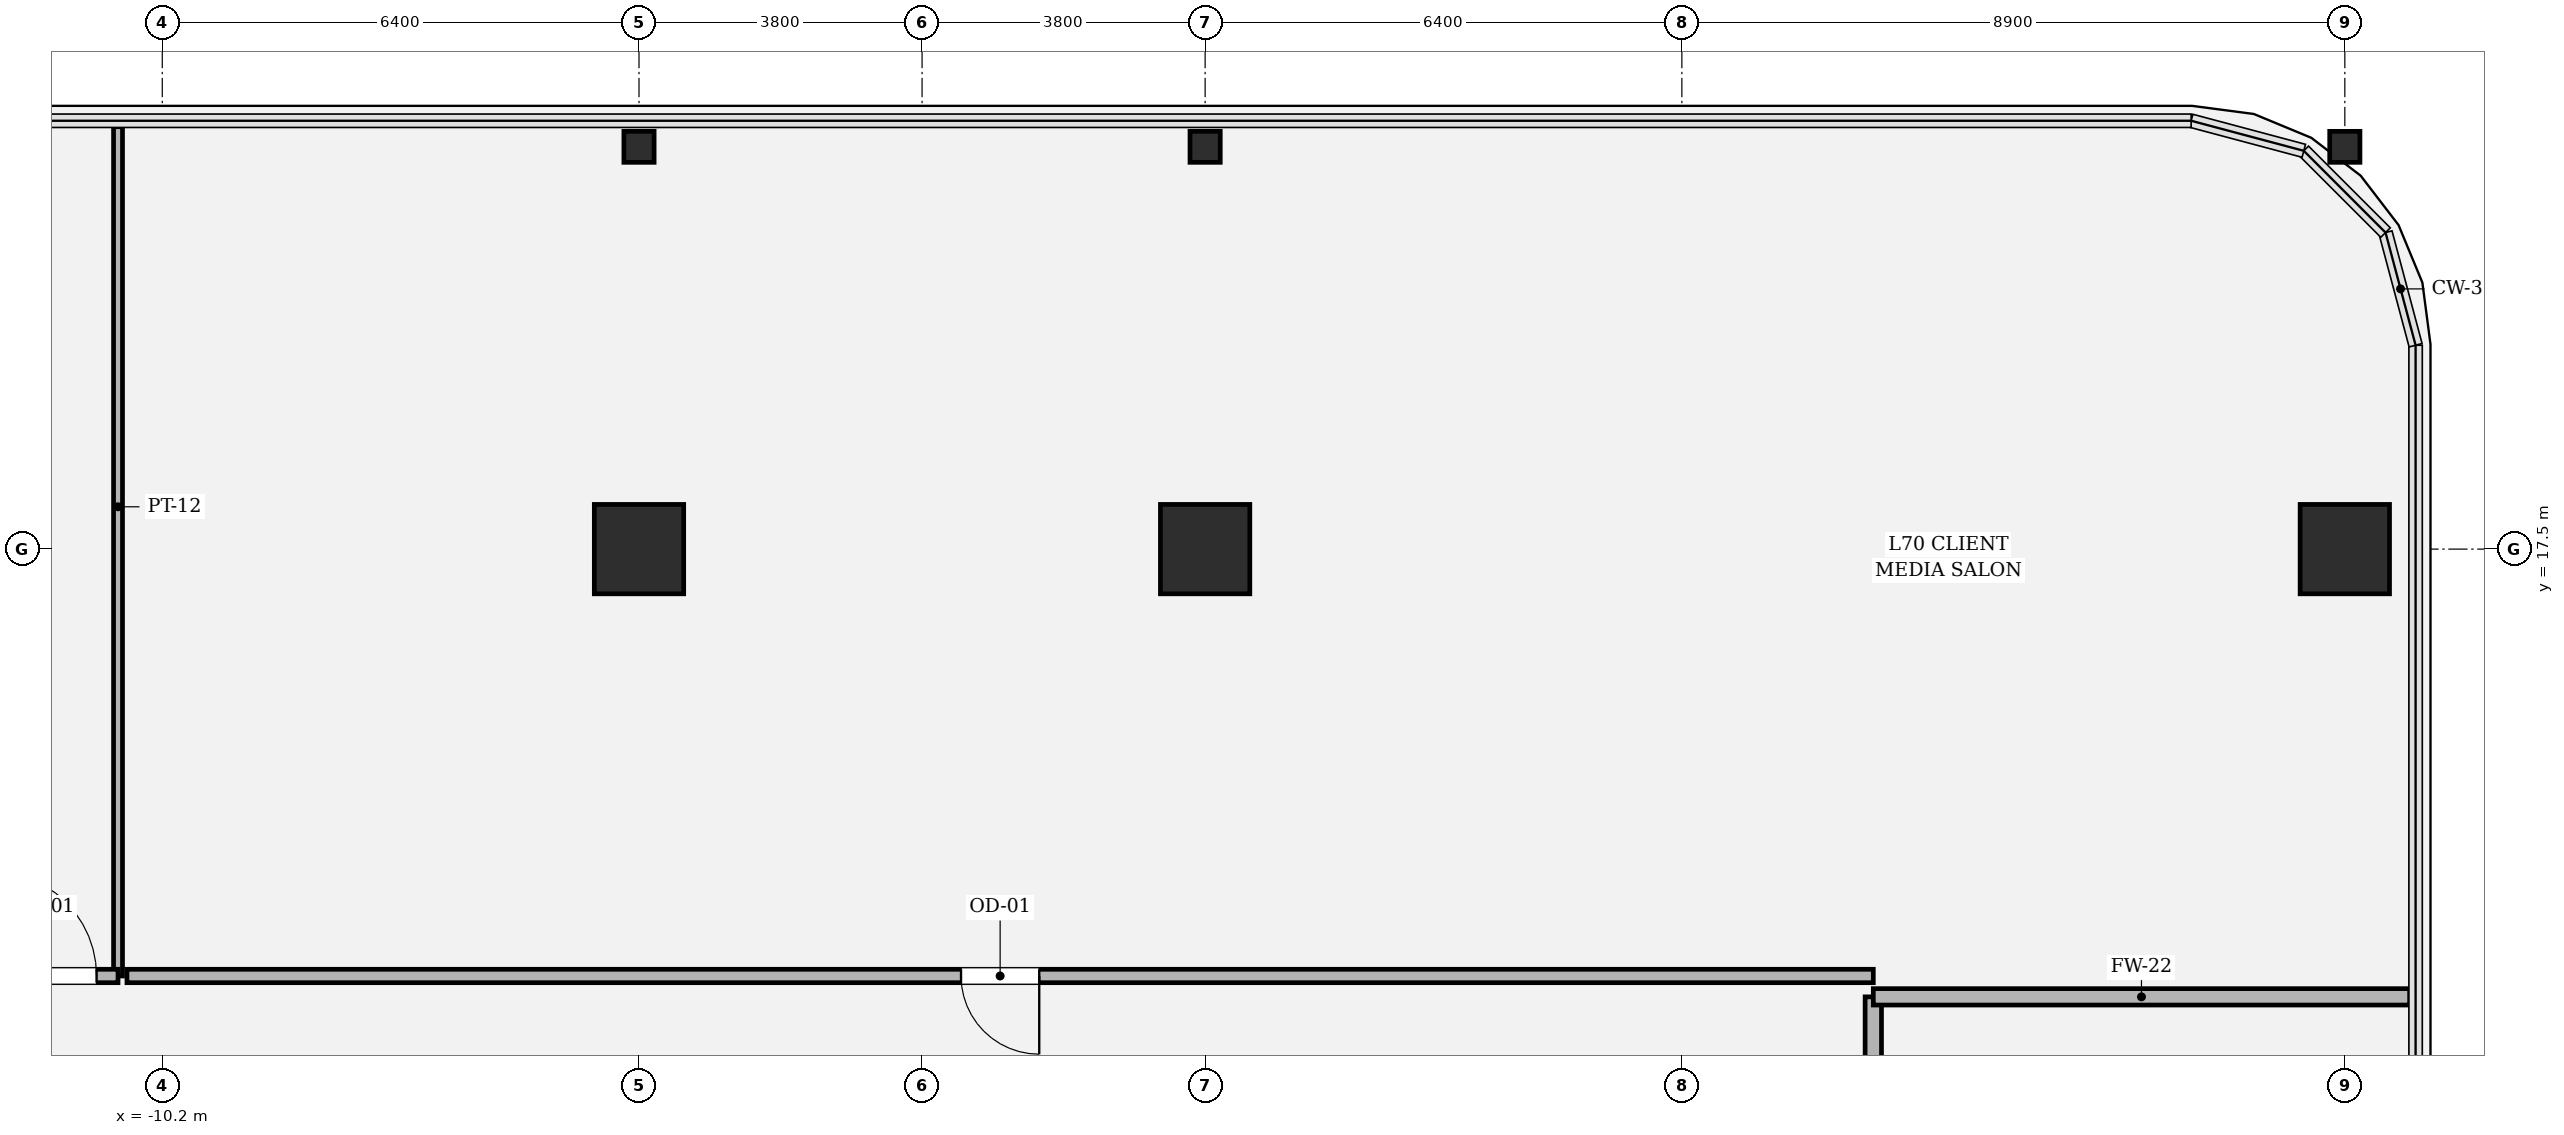
"""IFC4 building model, lengths in metres.
Left out: names, types, materials, properties, quantities, classifications, styles, units other than length and angle.
Written with IfcOpenShell. Run it as: python <this file> out.ifc"""

import sys

from ifc_helpers import new_model, si_unit, direction, frame, frame_2d, origin, origin_2d, place, context, subcontext, project, spatial, rectangle, hollow_rectangle, i_section, extrude, element, fill, save


model = new_model("IFC4")
c1 = context("Model", 3, precision=1e-05, world=origin(), true_north=direction((0.0, 1.0)))
c2 = subcontext(c1, "Body", "Model", "MODEL_VIEW")
j1 = project(units=[si_unit("LENGTHUNIT", "METRE"), si_unit("PLANEANGLEUNIT", "RADIAN")], contexts=[c1])
p1 = place(None, origin())
s1 = spatial("IfcSite", under=j1, at=p1, CompositionType="ELEMENT")
p2 = place(p1, origin())
s2 = spatial("IfcBuilding", under=s1, at=p2, CompositionType="ELEMENT")
p3 = place(p2, frame((0.0, 0.0, 296.4)))
s3 = spatial("IfcBuildingStorey", under=s2, at=p3, CompositionType="ELEMENT", Elevation=296.4)
for number, where, z_axis, x_axis in (
    (1, (19.1, 17.5, 0.0), (0.0, 0.0, 1.0), (1.0, 0.0, 0.0)),
    (2, (3.8, 17.5, 0.0), (0.0, 0.0, 1.0), (1.0, 0.0, 0.0)),
    (3, (-3.8, 17.5, 0.0), (0.0, 0.0, 1.0), (1.0, 0.0, 0.0)),
):
    element("IfcColumn", number, at=place(p3, frame(where, z_axis=z_axis, x_axis=x_axis)), inside=s3, PredefinedType="COLUMN", context=c2, shape_type="SweptSolid", body=[
        extrude(hollow_rectangle(XDim=1.2, YDim=1.2, WallThickness=0.035, at=origin_2d()), origin(), (0.0, 0.0, 1.0), 4.2),
    ])
for number, where, z_axis, x_axis in (
    (4, (-3.8, 22.9, 0.0), (0.0, 0.0, 1.0), (1.0, 0.0, 0.0)),
    (5, (3.8, 22.9, 0.0), (0.0, 0.0, 1.0), (1.0, 0.0, 0.0)),
    (6, (19.1, 22.9, 0.0), (0.0, 0.0, 1.0), (1.0, 0.0, 0.0)),
):
    element("IfcColumn", number, at=place(p3, frame(where, z_axis=z_axis, x_axis=x_axis)), inside=s3, PredefinedType="COLUMN", context=c2, shape_type="SweptSolid", body=[
        extrude(i_section(OverallWidth=0.406, OverallDepth=0.416, WebThickness=0.029, FlangeThickness=0.048, FilletRadius=0.018, at=origin_2d()), origin(), (0.0, 0.0, 1.0), 4.198),
    ])
p4 = place(p3, frame((12.77, -11.77, 0.0), z_axis=(0.0, 0.0, 1.0), x_axis=(0.0, 1.0, 0.0)))
e7 = element("IfcWall", 7, at=p4, inside=s3, PredefinedType="SOLIDWALL", context=c2, shape_type="SweptSolid", body=[
    extrude(rectangle(XDim=23.26, YDim=0.22, at=frame_2d((11.63, 0.0))), origin(), (0.0, 0.0, 1.0), 3.394),
])
p5 = place(p3, frame((12.77, 11.49, 0.0), z_axis=(0.0, 0.0, 1.0), x_axis=(1.0, 0.0, 0.0)))
e8 = element("IfcWall", 8, at=p5, inside=s3, PredefinedType="SOLIDWALL", context=c2, shape_type="SweptSolid", body=[
    extrude(rectangle(XDim=7.2, YDim=0.22, at=frame_2d((3.6, 0.0))), origin(), (0.0, 0.0, 1.0), 3.394),
])
p6 = place(p3, frame((-10.794, 23.17, 0.0), z_axis=(0.0, 0.0, 1.0), x_axis=(0.0, -1.0, 0.0)))
e9 = element("IfcWall", 9, at=p6, inside=s3, PredefinedType="PARTITIONING", context=c2, shape_type="SweptSolid", body=[
    extrude(rectangle(XDim=11.4, YDim=0.12, at=frame_2d((5.7, 0.0))), origin(), (0.0, 0.0, 1.0), 2.714),
])
p7 = place(p3, frame((-10.794, 11.77, 0.0), z_axis=(0.0, 0.0, 1.0), x_axis=(-1.0, 0.0, 0.0)))
e10 = element("IfcWall", 10, at=p7, inside=s3, PredefinedType="PARTITIONING", context=c2, shape_type="SweptSolid", body=[
    extrude(rectangle(XDim=1.976, YDim=0.18, at=frame_2d((0.988, 0.0))), origin(), (0.0, 0.0, 1.0), 4.0),
])
p8 = place(p7, frame((0.288, 0.0, 0.0)))
e11 = element("IfcOpeningElement", 11, at=p8, cuts=e10, PredefinedType="OPENING", context=c2, shape_type="SweptSolid", body=[
    extrude(rectangle(XDim=1.4, YDim=2.25, at=frame_2d((0.7, 1.125))), frame((0.0, 0.1, 0.0), z_axis=(0.0, -1.0, 0.0), x_axis=(1.0, 0.0, 0.0)), (0.0, 0.0, 1.0), 0.2),
])
p9 = place(p3, frame((12.77, 11.77, 0.0), z_axis=(0.0, 0.0, 1.0), x_axis=(-1.0, 0.0, 0.0)))
e12 = element("IfcWall", 12, at=p9, inside=s3, PredefinedType="PARTITIONING", context=c2, shape_type="SweptSolid", body=[
    extrude(rectangle(XDim=23.444, YDim=0.18, at=frame_2d((11.722, 0.0))), origin(), (0.0, 0.0, 1.0), 3.394),
])
p10 = place(p9, frame((11.197, 0.0, 0.0)))
e13 = element("IfcOpeningElement", 13, at=p10, cuts=e12, PredefinedType="OPENING", context=c2, shape_type="SweptSolid", body=[
    extrude(rectangle(XDim=1.05, YDim=2.2, at=frame_2d((0.525, 1.1))), frame((0.0, 0.1, 0.0), z_axis=(0.0, -1.0, 0.0), x_axis=(1.0, 0.0, 0.0)), (0.0, 0.0, 1.0), 0.2),
])
p11 = place(p8, origin())
e14 = element("IfcDoor", 14, at=p11, inside=s3, OperationType="SINGLE_SWING_RIGHT", PredefinedType="DOOR", context=c2, shape_type="SweptSolid", body=[
    extrude(rectangle(XDim=1.4, YDim=2.25, at=frame_2d((0.7, 1.125))), frame((0.0, 0.025, 0.0), z_axis=(0.0, -1.0, 0.0), x_axis=(1.0, 0.0, 0.0)), (0.0, 0.0, 1.0), 0.05),
])
fill(e11, e14)
p12 = place(p10, origin())
e15 = element("IfcDoor", 15, at=p12, inside=s3, OperationType="SINGLE_SWING_LEFT", PredefinedType="DOOR", context=c2, shape_type="SweptSolid", body=[
    extrude(rectangle(XDim=1.05, YDim=2.2, at=frame_2d((0.525, 1.1))), frame((0.0, 0.025, 0.0), z_axis=(0.0, -1.0, 0.0), x_axis=(1.0, 0.0, 0.0)), (0.0, 0.0, 1.0), 0.05),
])
fill(e13, e15)
save(model, sys.argv[1])
